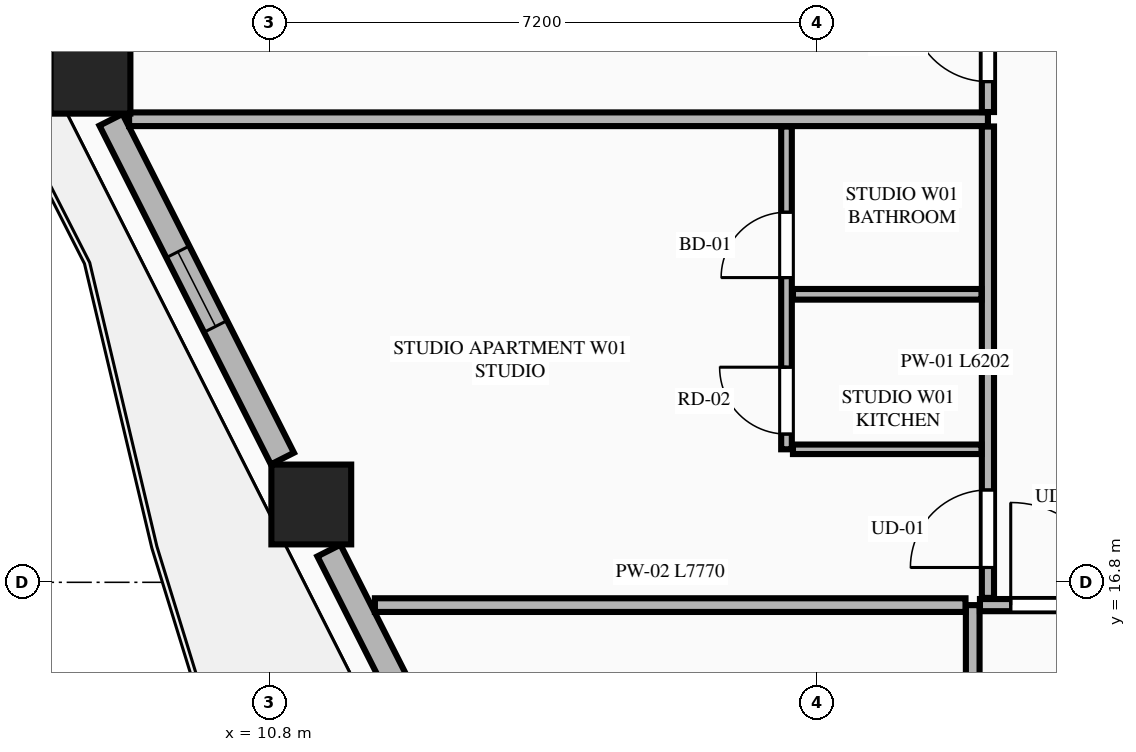
"""IFC4 building model, lengths in metres.
Left out: names, types, materials, properties, quantities, classifications, styles, units other than length and angle.
Written with IfcOpenShell. Run it as: python <this file> out.ifc"""

import sys

from ifc_helpers import new_model, si_unit, direction, frame, frame_2d, origin, origin_2d, place, context, subcontext, project, spatial, rectangle, extrude, element, fill, save


model = new_model("IFC4")
c1 = context("Model", 3, precision=1e-05, world=origin(), true_north=direction((0.0, 1.0)))
c2 = subcontext(c1, "Body", "Model", "MODEL_VIEW")
j1 = project(units=[si_unit("LENGTHUNIT", "METRE"), si_unit("PLANEANGLEUNIT", "RADIAN")], contexts=[c1])
p1 = place(None, origin())
s1 = spatial("IfcSite", under=j1, at=p1, CompositionType="ELEMENT")
p2 = place(p1, origin())
s2 = spatial("IfcBuilding", under=s1, at=p2, CompositionType="ELEMENT")
p3 = place(p2, frame((0.0, 0.0, 123.25)))
s3 = spatial("IfcBuildingStorey", under=s2, at=p3, CompositionType="ELEMENT", Elevation=123.25)
for number, where, z_axis, x_axis in (
    (1, (8.443, 23.491, 0.0), (0.0, 0.0, 1.0), (1.0, 0.0, 0.0)),
    (2, (11.348, 17.824, 0.0), (0.0, 0.0, 1.0), (1.0, 0.0, 0.0)),
):
    element("IfcColumn", number, at=place(p3, frame(where, z_axis=z_axis, x_axis=x_axis)), inside=s3, PredefinedType="COLUMN", context=c2, shape_type="SweptSolid", body=[
        extrude(rectangle(XDim=1.05, YDim=1.05, at=origin_2d()), origin(), (0.0, 0.0, 1.0), 3.55),
    ])
p4 = place(p3, frame((8.713, 22.885, 0.0), z_axis=(0.0, 0.0, 1.0), x_axis=(0.451470533039, -0.892286029139, 0.0)))
e3 = element("IfcWall", 3, at=p4, inside=s3, PredefinedType="STANDARD", context=c2, shape_type="SweptSolid", body=[
    extrude(rectangle(XDim=4.995, YDim=0.34, at=frame_2d((2.498, 0.0))), origin(), (0.0, 0.0, 1.0), 2.797),
])
p5 = place(p4, frame((1.947, 0.0, 0.75)))
e4 = element("IfcOpeningElement", 4, at=p5, cuts=e3, PredefinedType="OPENING", context=c2, shape_type="SweptSolid", body=[
    extrude(rectangle(XDim=1.1, YDim=1.897, at=frame_2d((0.55, 0.948))), frame((0.0, 0.18, 0.0), z_axis=(0.0, -1.0, 0.0), x_axis=(1.0, 0.0, 0.0)), (0.0, 0.0, 1.0), 0.36),
])
p6 = place(p3, frame((11.58, 17.218, 0.0), z_axis=(0.0, 0.0, 1.0), x_axis=(0.451567731634, -0.892236842855, 0.0)))
e5 = element("IfcWall", 5, at=p6, inside=s3, PredefinedType="STANDARD", context=c2, shape_type="SweptSolid", body=[
    extrude(rectangle(XDim=5.219, YDim=0.34, at=frame_2d((2.61, 0.0))), origin(), (0.0, 0.0, 1.0), 2.797),
])
p7 = place(p6, frame((2.587, 0.0, 0.0)))
e6 = element("IfcOpeningElement", 6, at=p7, cuts=e5, PredefinedType="OPENING", context=c2, shape_type="SweptSolid", body=[
    extrude(rectangle(XDim=1.1, YDim=2.25, at=frame_2d((0.55, 1.125))), frame((0.0, 0.18, 0.0), z_axis=(0.0, -1.0, 0.0), x_axis=(1.0, 0.0, 0.0)), (0.0, 0.0, 1.0), 0.36),
])
p8 = place(p3, frame((20.05, 4.105, 0.0), z_axis=(0.0, 0.0, 1.0), x_axis=(0.0, 1.0, 0.0)))
e7 = element("IfcWall", 7, at=p8, inside=s3, PredefinedType="PARTITIONING", context=c2, shape_type="SweptSolid", body=[
    extrude(rectangle(XDim=12.395, YDim=0.18, at=frame_2d((6.198, 0.0))), origin(), (0.0, 0.0, 1.0), 3.34),
])
p9 = place(p3, frame((20.145, 16.5, 0.0), z_axis=(0.0, 0.0, 1.0), x_axis=(1.0, 0.0, 0.0)))
e8 = element("IfcWall", 8, at=p9, inside=s3, PredefinedType="PARTITIONING", context=c2, shape_type="SweptSolid", body=[
    extrude(rectangle(XDim=24.51, YDim=0.16, at=frame_2d((12.255, 0.0))), origin(), (0.0, 0.0, 1.0), 3.34),
])
p10 = place(p9, frame((0.405, 0.0, 0.0)))
e9 = element("IfcOpeningElement", 9, at=p10, cuts=e8, PredefinedType="OPENING", context=c2, shape_type="SweptSolid", body=[
    extrude(rectangle(XDim=1.35, YDim=2.35, at=frame_2d((0.675, 1.175))), frame((0.0, 0.09, 0.0), z_axis=(0.0, -1.0, 0.0), x_axis=(1.0, 0.0, 0.0)), (0.0, 0.0, 1.0), 0.18),
])
p11 = place(p3, frame((12.185, 16.5, 0.0), z_axis=(0.0, 0.0, 1.0), x_axis=(1.0, 0.0, 0.0)))
e10 = element("IfcWall", 10, at=p11, inside=s3, PredefinedType="PARTITIONING", context=c2, shape_type="SweptSolid", body=[
    extrude(rectangle(XDim=7.77, YDim=0.18, at=frame_2d((3.885, 0.0))), origin(), (0.0, 0.0, 1.0), 3.34),
])
p12 = place(p3, frame((20.25, 16.595, 0.0), z_axis=(0.0, 0.0, 1.0), x_axis=(0.0, 1.0, 0.0)))
e11 = element("IfcWall", 11, at=p12, inside=s3, PredefinedType="PARTITIONING", context=c2, shape_type="SweptSolid", body=[
    extrude(rectangle(XDim=6.202, YDim=0.16, at=frame_2d((3.101, 0.0))), origin(), (0.0, 0.0, 1.0), 3.34),
])
p13 = place(p12, frame((0.4, 0.0, 0.0)))
e12 = element("IfcOpeningElement", 12, at=p13, cuts=e11, PredefinedType="OPENING", context=c2, shape_type="SweptSolid", body=[
    extrude(rectangle(XDim=1.02, YDim=2.25, at=frame_2d((0.51, 1.125))), frame((0.0, 0.09, 0.0), z_axis=(0.0, -1.0, 0.0), x_axis=(1.0, 0.0, 0.0)), (0.0, 0.0, 1.0), 0.18),
])
p14 = place(p3, frame((17.685, 18.55, 0.0), z_axis=(0.0, 0.0, 1.0), x_axis=(1.0, 0.0, 0.0)))
e13 = element("IfcWall", 13, at=p14, inside=s3, PredefinedType="PARTITIONING", context=c2, shape_type="SweptSolid", body=[
    extrude(rectangle(XDim=2.48, YDim=0.125, at=frame_2d((1.24, 0.0))), origin(), (0.0, 0.0, 1.0), 2.722),
])
p15 = place(p3, frame((17.6, 18.55, 0.0), z_axis=(0.0, 0.0, 1.0), x_axis=(0.0, 1.0, 0.0)))
e14 = element("IfcWall", 14, at=p15, inside=s3, PredefinedType="PLUMBINGWALL", context=c2, shape_type="SweptSolid", body=[
    extrude(rectangle(XDim=4.247, YDim=0.14, at=frame_2d((2.124, 0.0))), origin(), (0.0, 0.0, 1.0), 3.34),
])
p16 = place(p15, frame((2.259, 0.0, 0.0)))
e15 = element("IfcOpeningElement", 15, at=p16, cuts=e14, PredefinedType="OPENING", context=c2, shape_type="SweptSolid", body=[
    extrude(rectangle(XDim=0.86, YDim=2.1, at=frame_2d((0.43, 1.05))), frame((0.0, 0.08, 0.0), z_axis=(0.0, -1.0, 0.0), x_axis=(1.0, 0.0, 0.0)), (0.0, 0.0, 1.0), 0.16),
])
p17 = place(p15, frame((0.2, 0.0, 0.0)))
e16 = element("IfcOpeningElement", 16, at=p17, cuts=e14, PredefinedType="OPENING", context=c2, shape_type="SweptSolid", body=[
    extrude(rectangle(XDim=0.88, YDim=2.15, at=frame_2d((0.44, 1.075))), frame((0.0, 0.08, 0.0), z_axis=(0.0, -1.0, 0.0), x_axis=(1.0, 0.0, 0.0)), (0.0, 0.0, 1.0), 0.16),
])
p18 = place(p3, frame((17.685, 20.589, 0.0), z_axis=(0.0, 0.0, 1.0), x_axis=(1.0, 0.0, 0.0)))
e17 = element("IfcWall", 17, at=p18, inside=s3, PredefinedType="PLUMBINGWALL", context=c2, shape_type="SweptSolid", body=[
    extrude(rectangle(XDim=2.48, YDim=0.14, at=frame_2d((1.24, 0.0))), origin(), (0.0, 0.0, 1.0), 3.34),
])
p19 = place(p3, frame((8.951, 22.892, 0.0), z_axis=(0.0, 0.0, 1.0), x_axis=(1.0, 0.0, 0.0)))
e18 = element("IfcWall", 18, at=p19, inside=s3, PredefinedType="PARTITIONING", context=c2, shape_type="SweptSolid", body=[
    extrude(rectangle(XDim=11.299, YDim=0.18, at=frame_2d((5.649, 0.0))), origin(), (0.0, 0.0, 1.0), 3.34),
])
p20 = place(p3, frame((20.25, 22.987, 0.0), z_axis=(0.0, 0.0, 1.0), x_axis=(0.0, 1.0, 0.0)))
e19 = element("IfcWall", 19, at=p20, inside=s3, PredefinedType="PARTITIONING", context=c2, shape_type="SweptSolid", body=[
    extrude(rectangle(XDim=6.014, YDim=0.16, at=frame_2d((3.007, 0.0))), origin(), (0.0, 0.0, 1.0), 3.34),
])
p21 = place(p20, frame((0.4, 0.0, 0.0)))
e20 = element("IfcOpeningElement", 20, at=p21, cuts=e19, PredefinedType="OPENING", context=c2, shape_type="SweptSolid", body=[
    extrude(rectangle(XDim=1.02, YDim=2.25, at=frame_2d((0.51, 1.125))), frame((0.0, 0.09, 0.0), z_axis=(0.0, -1.0, 0.0), x_axis=(1.0, 0.0, 0.0)), (0.0, 0.0, 1.0), 0.18),
])
p22 = place(p5, origin())
e21 = element("IfcWindow", 21, at=p22, inside=s3, PartitioningType="SINGLE_PANEL", PredefinedType="WINDOW", context=c2, shape_type="SweptSolid", body=[
    extrude(rectangle(XDim=1.1, YDim=1.897, at=frame_2d((0.55, 0.948))), frame((0.0, 0.03, 0.0), z_axis=(0.0, -1.0, 0.0), x_axis=(1.0, 0.0, 0.0)), (0.0, 0.0, 1.0), 0.06),
])
fill(e4, e21)
p23 = place(p10, origin())
e22 = element("IfcDoor", 22, at=p23, inside=s3, OperationType="SINGLE_SWING_LEFT", PredefinedType="DOOR", context=c2, shape_type="SweptSolid", body=[
    extrude(rectangle(XDim=1.35, YDim=2.35, at=frame_2d((0.675, 1.175))), frame((0.0, 0.025, 0.0), z_axis=(0.0, -1.0, 0.0), x_axis=(1.0, 0.0, 0.0)), (0.0, 0.0, 1.0), 0.05),
])
fill(e9, e22)
p24 = place(p16, origin())
e23 = element("IfcDoor", 23, at=p24, inside=s3, OperationType="SINGLE_SWING_LEFT", PredefinedType="DOOR", context=c2, shape_type="SweptSolid", body=[
    extrude(rectangle(XDim=0.86, YDim=2.1, at=frame_2d((0.43, 1.05))), frame((0.0, 0.025, 0.0), z_axis=(0.0, -1.0, 0.0), x_axis=(1.0, 0.0, 0.0)), (0.0, 0.0, 1.0), 0.05),
])
fill(e15, e23)
p25 = place(p13, origin())
e24 = element("IfcDoor", 24, at=p25, inside=s3, OperationType="SINGLE_SWING_LEFT", PredefinedType="DOOR", context=c2, shape_type="SweptSolid", body=[
    extrude(rectangle(XDim=1.02, YDim=2.25, at=frame_2d((0.51, 1.125))), frame((0.0, 0.025, 0.0), z_axis=(0.0, -1.0, 0.0), x_axis=(1.0, 0.0, 0.0)), (0.0, 0.0, 1.0), 0.05),
])
fill(e12, e24)
p26 = place(p17, origin())
e25 = element("IfcDoor", 25, at=p26, inside=s3, OperationType="SINGLE_SWING_RIGHT", PredefinedType="DOOR", context=c2, shape_type="SweptSolid", body=[
    extrude(rectangle(XDim=0.88, YDim=2.15, at=frame_2d((0.44, 1.075))), frame((0.0, 0.025, 0.0), z_axis=(0.0, -1.0, 0.0), x_axis=(1.0, 0.0, 0.0)), (0.0, 0.0, 1.0), 0.05),
])
fill(e16, e25)
p27 = place(p21, origin())
e26 = element("IfcDoor", 26, at=p27, inside=s3, OperationType="SINGLE_SWING_RIGHT", PredefinedType="DOOR", context=c2, shape_type="SweptSolid", body=[
    extrude(rectangle(XDim=1.02, YDim=2.25, at=frame_2d((0.51, 1.125))), frame((0.0, 0.025, 0.0), z_axis=(0.0, -1.0, 0.0), x_axis=(1.0, 0.0, 0.0)), (0.0, 0.0, 1.0), 0.05),
])
fill(e20, e26)
save(model, sys.argv[1])
